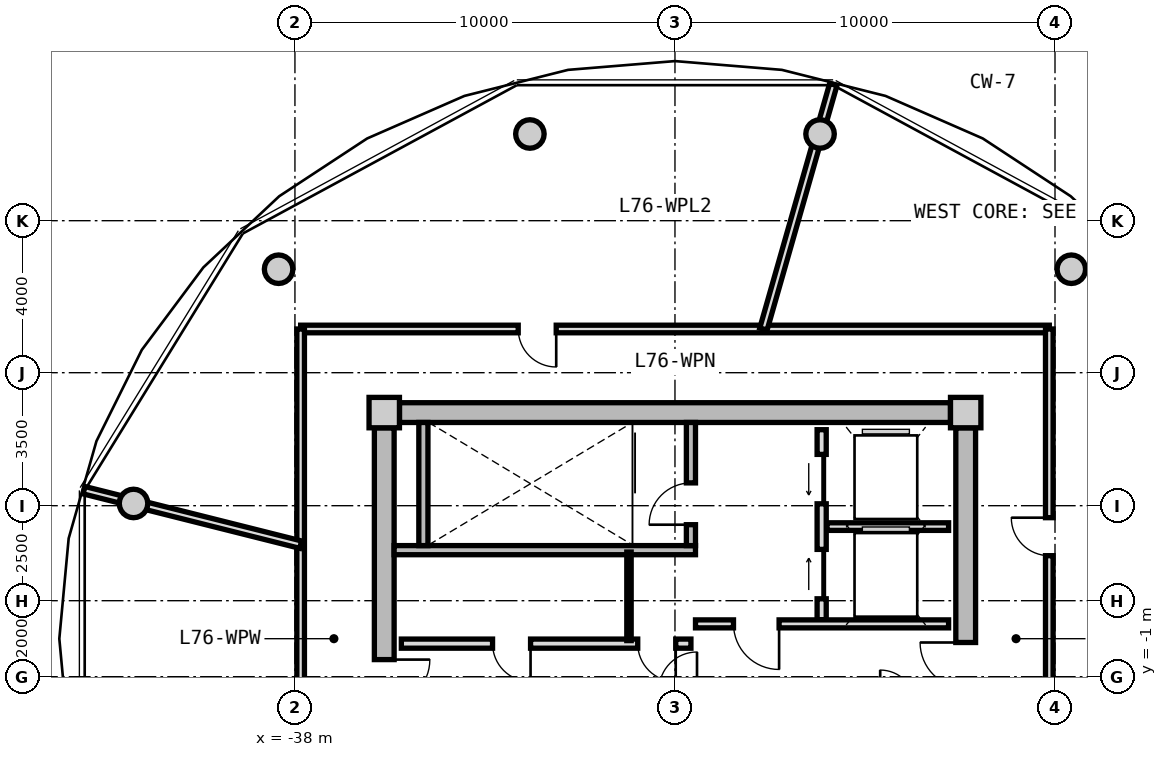
"""IFC4 building model, lengths in metres.
Left out: names, types, materials, properties, quantities, classifications, styles, units other than length and angle.
Written with IfcOpenShell. Run it as: python <this file> out.ifc"""

import sys

from ifc_helpers import new_model, si_unit, direction, frame, frame_2d, origin, origin_2d, place, context, subcontext, project, spatial, rectangle, circle, extrude, source, transform, mapped, element, fill, save


model = new_model("IFC4")
c1 = context("Model", 3, precision=1e-05, world=origin(), true_north=direction((0.0, 1.0)))
c2 = subcontext(c1, "Body", "Model", "MODEL_VIEW")
j1 = project(units=[si_unit("LENGTHUNIT", "METRE"), si_unit("PLANEANGLEUNIT", "RADIAN")], contexts=[c1])
p1 = place(None, origin())
s1 = spatial("IfcSite", under=j1, at=p1, CompositionType="ELEMENT")
p2 = place(p1, origin())
s2 = spatial("IfcBuilding", under=s1, at=p2, CompositionType="ELEMENT")
p3 = place(p2, frame((0.0, 0.0, 244.4)))
s3 = spatial("IfcBuildingStorey", under=s2, at=p3, CompositionType="ELEMENT", Elevation=244.4)
m1 = source(origin(), c2, "Body", "SweptSolid", [
    extrude(rectangle(XDim=0.8, YDim=0.8, at=origin_2d()), origin(), (0.0, 0.0, 1.0), 5.45),
])
for number, where, z_axis, x_axis in (
    (1, (-20.35, 5.95, 0.0), (0.0, 0.0, 1.0), (1.0, 0.0, 0.0)),
    (2, (-35.65, 5.95, 0.0), (0.0, 0.0, 1.0), (1.0, 0.0, 0.0)),
):
    element("IfcColumn", number, at=place(p3, frame(where, z_axis=z_axis, x_axis=x_axis)), inside=s3, PredefinedType="COLUMN", context=c2, shape_type="MappedRepresentation", body=[
        mapped(m1, transform((0.0, 0.0, 0.0), x_axis=(1.0, 0.0, 0.0), y_axis=(0.0, 1.0, 0.0), z_axis=(0.0, 0.0, 1.0), scale=1.0)),
    ])
m2 = source(origin(), c2, "Body", "SweptSolid", [
    extrude(rectangle(XDim=14.5, YDim=0.52, at=frame_2d((7.25, 0.0))), origin(), (0.0, 0.0, 1.0), 5.175),
])
p4 = place(p3, frame((-35.25, 5.95, 0.0), z_axis=(0.0, 0.0, 1.0), x_axis=(1.0, 0.0, 0.0)))
e3 = element("IfcWall", 3, at=p4, inside=s3, PredefinedType="SHEAR", context=c2, shape_type="MappedRepresentation", body=[
    mapped(m2, transform((0.0, 0.0, 0.0), x_axis=(1.0, 0.0, 0.0), y_axis=(0.0, 1.0, 0.0), z_axis=(0.0, 0.0, 1.0), scale=1.0)),
])
m3 = source(origin(), c2, "Body", "SweptSolid", [
    extrude(rectangle(XDim=11.1, YDim=0.52, at=frame_2d((5.55, 0.0))), origin(), (0.0, 0.0, 1.0), 5.175),
])
p5 = place(p3, frame((-35.65, -5.55, 0.0), z_axis=(0.0, 0.0, 1.0), x_axis=(0.0, 1.0, 0.0)))
e4 = element("IfcWall", 4, at=p5, inside=s3, PredefinedType="SHEAR", context=c2, shape_type="MappedRepresentation", body=[
    mapped(m3, transform((0.0, 0.0, 0.0), x_axis=(1.0, 0.0, 0.0), y_axis=(0.0, 1.0, 0.0), z_axis=(0.0, 0.0, 1.0), scale=1.0)),
])
p6 = place(p5, frame((3.8, 0.0, 0.0)))
e5 = element("IfcOpeningElement", 5, at=p6, cuts=e4, PredefinedType="OPENING", context=c2, shape_type="SweptSolid", body=[
    extrude(rectangle(XDim=1.2, YDim=2.15, at=frame_2d((0.6, 1.075))), frame((0.0, 0.27, 0.0), z_axis=(0.0, -1.0, 0.0), x_axis=(1.0, 0.0, 0.0)), (0.0, 0.0, 1.0), 0.54),
])
p7 = place(p3, frame((-20.35, 5.55, 0.0), z_axis=(0.0, 0.0, 1.0), x_axis=(0.0, -1.0, 0.0)))
e6 = element("IfcWall", 6, at=p7, inside=s3, PredefinedType="SHEAR", context=c2, shape_type="MappedRepresentation", body=[
    mapped(m3, transform((0.0, 0.0, 0.0), x_axis=(1.0, 0.0, 0.0), y_axis=(0.0, 1.0, 0.0), z_axis=(0.0, 0.0, 1.0), scale=1.0)),
])
p8 = place(p7, frame((5.65, 0.0, 0.0)))
e7 = element("IfcOpeningElement", 7, at=p8, cuts=e6, PredefinedType="OPENING", context=c2, shape_type="SweptSolid", body=[
    extrude(rectangle(XDim=1.2, YDim=2.15, at=frame_2d((0.6, 1.075))), frame((0.0, 0.27, 0.0), z_axis=(0.0, -1.0, 0.0), x_axis=(1.0, 0.0, 0.0)), (0.0, 0.0, 1.0), 0.54),
])
p9 = place(p7, frame((9.3, 0.0, 0.0)))
e8 = element("IfcOpeningElement", 8, at=p9, cuts=e6, PredefinedType="OPENING", context=c2, shape_type="SweptSolid", body=[
    extrude(rectangle(XDim=1.0, YDim=2.1, at=frame_2d((0.5, 1.05))), frame((0.0, 0.27, 0.0), z_axis=(0.0, -1.0, 0.0), x_axis=(1.0, 0.0, 0.0)), (0.0, 0.0, 1.0), 0.54),
])
m4 = source(origin(), c2, "Body", "SweptSolid", [
    extrude(circle(Radius=0.375, at=origin_2d()), origin(), (0.0, 0.0, 1.0), 5.45),
])
for number, where, z_axis, x_axis in (
    (9, (-17.57, 9.723, 0.0), (0.0, 0.0, 1.0), (1.0, 0.0, 0.0)),
    (10, (-24.182, 13.281, 0.0), (0.0, 0.0, 1.0), (1.0, 0.0, 0.0)),
    (11, (-31.818, 13.281, 0.0), (0.0, 0.0, 1.0), (1.0, 0.0, 0.0)),
    (12, (-38.43, 9.723, 0.0), (0.0, 0.0, 1.0), (1.0, 0.0, 0.0)),
    (13, (-42.247, 3.559, 0.0), (0.0, 0.0, 1.0), (1.0, 0.0, 0.0)),
):
    element("IfcColumn", number, at=place(p3, frame(where, z_axis=z_axis, x_axis=x_axis)), inside=s3, PredefinedType="COLUMN", context=c2, shape_type="MappedRepresentation", body=[
        mapped(m4, transform((0.0, 0.0, 0.0), x_axis=(1.0, 0.0, 0.0), y_axis=(0.0, 1.0, 0.0), z_axis=(0.0, 0.0, 1.0), scale=1.0)),
    ])
m5 = source(origin(), c2, "Body", "SweptSolid", [
    extrude(rectangle(XDim=7.93, YDim=0.24, at=frame_2d((3.965, 0.0))), origin(), (0.0, 0.0, 1.0), 5.175),
])
p10 = place(p3, frame((-35.39, 2.33, 0.0), z_axis=(0.0, 0.0, 1.0), x_axis=(1.0, 0.0, 0.0)))
e14 = element("IfcWall", 14, at=p10, inside=s3, PredefinedType="PARTITIONING", context=c2, shape_type="MappedRepresentation", body=[
    mapped(m5, transform((0.0, 0.0, 0.0), x_axis=(1.0, 0.0, 0.0), y_axis=(0.0, 1.0, 0.0), z_axis=(0.0, 0.0, 1.0), scale=1.0)),
])
m6 = source(origin(), c2, "Body", "SweptSolid", [
    extrude(rectangle(XDim=3.24, YDim=0.24, at=frame_2d((1.62, 0.0))), origin(), (0.0, 0.0, 1.0), 5.175),
])
p11 = place(p3, frame((-34.62, 2.45, 0.0), z_axis=(0.0, 0.0, 1.0), x_axis=(0.0, 1.0, 0.0)))
e15 = element("IfcWall", 15, at=p11, inside=s3, PredefinedType="PARTITIONING", context=c2, shape_type="MappedRepresentation", body=[
    mapped(m6, transform((0.0, 0.0, 0.0), x_axis=(1.0, 0.0, 0.0), y_axis=(0.0, 1.0, 0.0), z_axis=(0.0, 0.0, 1.0), scale=1.0)),
])
p12 = place(p3, frame((-27.58, 2.45, 0.0), z_axis=(0.0, 0.0, 1.0), x_axis=(0.0, 1.0, 0.0)))
e16 = element("IfcWall", 16, at=p12, inside=s3, PredefinedType="PARTITIONING", context=c2, shape_type="MappedRepresentation", body=[
    mapped(m6, transform((0.0, 0.0, 0.0), x_axis=(1.0, 0.0, 0.0), y_axis=(0.0, 1.0, 0.0), z_axis=(0.0, 0.0, 1.0), scale=1.0)),
])
p13 = place(p12, frame((0.55, 0.0, 0.0)))
e17 = element("IfcOpeningElement", 17, at=p13, cuts=e16, PredefinedType="OPENING", context=c2, shape_type="SweptSolid", body=[
    extrude(rectangle(XDim=1.1, YDim=2.15, at=frame_2d((0.55, 1.075))), frame((0.0, 0.13, 0.0), z_axis=(0.0, -1.0, 0.0), x_axis=(1.0, 0.0, 0.0)), (0.0, 0.0, 1.0), 0.26),
])
m7 = source(origin(), c2, "Body", "SweptSolid", [
    extrude(rectangle(XDim=5.0, YDim=0.24, at=frame_2d((2.5, 0.0))), origin(), (0.0, 0.0, 1.0), 5.16),
])
p14 = place(p3, frame((-24.14, 0.5, 0.0), z_axis=(0.0, 0.0, 1.0), x_axis=(0.0, 1.0, 0.0)))
e18 = element("IfcWall", 18, at=p14, inside=s3, PredefinedType="PARTITIONING", context=c2, shape_type="MappedRepresentation", body=[
    mapped(m7, transform((0.0, 0.0, 0.0), x_axis=(1.0, 0.0, 0.0), y_axis=(0.0, 1.0, 0.0), z_axis=(0.0, 0.0, 1.0), scale=1.0)),
])
p15 = place(p14, frame((3.05, 0.0, 0.0)))
e19 = element("IfcOpeningElement", 19, at=p15, cuts=e18, PredefinedType="OPENING", context=c2, shape_type="SweptSolid", body=[
    extrude(rectangle(XDim=1.3, YDim=2.2, at=frame_2d((0.65, 1.1))), frame((0.0, 0.13, 0.0), z_axis=(0.0, -1.0, 0.0), x_axis=(1.0, 0.0, 0.0)), (0.0, 0.0, 1.0), 0.26),
])
p16 = place(p14, frame((0.55, 0.0, 0.0)))
e20 = element("IfcOpeningElement", 20, at=p16, cuts=e18, PredefinedType="OPENING", context=c2, shape_type="SweptSolid", body=[
    extrude(rectangle(XDim=1.3, YDim=2.2, at=frame_2d((0.65, 1.1))), frame((0.0, 0.13, 0.0), z_axis=(0.0, -1.0, 0.0), x_axis=(1.0, 0.0, 0.0)), (0.0, 0.0, 1.0), 0.26),
])
m8 = source(origin(), c2, "Body", "SweptSolid", [
    extrude(rectangle(XDim=3.2, YDim=0.2, at=frame_2d((1.6, 0.0))), origin(), (0.0, 0.0, 1.0), 5.16),
])
p17 = place(p3, frame((-24.0, 2.95, 0.0), z_axis=(0.0, 0.0, 1.0), x_axis=(1.0, 0.0, 0.0)))
e21 = element("IfcWall", 21, at=p17, inside=s3, PredefinedType="PARTITIONING", context=c2, shape_type="MappedRepresentation", body=[
    mapped(m8, transform((0.0, 0.0, 0.0), x_axis=(1.0, 0.0, 0.0), y_axis=(0.0, 1.0, 0.0), z_axis=(0.0, 0.0, 1.0), scale=1.0)),
])
m9 = source(origin(), c2, "Body", "SweptSolid", [
    extrude(rectangle(XDim=6.66, YDim=0.21, at=frame_2d((3.33, 0.0))), origin(), (0.0, 0.0, 1.0), 5.16),
])
p18 = place(p3, frame((-27.46, 0.39, 0.0), z_axis=(0.0, 0.0, 1.0), x_axis=(1.0, 0.0, 0.0)))
e22 = element("IfcWall", 22, at=p18, inside=s3, PredefinedType="PARTITIONING", context=c2, shape_type="MappedRepresentation", body=[
    mapped(m9, transform((0.0, 0.0, 0.0), x_axis=(1.0, 0.0, 0.0), y_axis=(0.0, 1.0, 0.0), z_axis=(0.0, 0.0, 1.0), scale=1.0)),
])
p19 = place(p18, frame((1.0, 0.0, 0.0)))
e23 = element("IfcOpeningElement", 23, at=p19, cuts=e22, PredefinedType="OPENING", context=c2, shape_type="SweptSolid", body=[
    extrude(rectangle(XDim=1.2, YDim=2.15, at=frame_2d((0.6, 1.075))), frame((0.0, 0.115, 0.0), z_axis=(0.0, -1.0, 0.0), x_axis=(1.0, 0.0, 0.0)), (0.0, 0.0, 1.0), 0.23),
])
m10 = source(origin(), c2, "Body", "SweptSolid", [
    extrude(rectangle(XDim=7.62, YDim=0.24, at=frame_2d((3.81, 0.0))), origin(), (0.0, 0.0, 1.0), 5.16),
])
p20 = place(p3, frame((-35.2, -0.13, 0.0), z_axis=(0.0, 0.0, 1.0), x_axis=(1.0, 0.0, 0.0)))
e24 = element("IfcWall", 24, at=p20, inside=s3, PredefinedType="PARTITIONING", context=c2, shape_type="MappedRepresentation", body=[
    mapped(m10, transform((0.0, 0.0, 0.0), x_axis=(1.0, 0.0, 0.0), y_axis=(0.0, 1.0, 0.0), z_axis=(0.0, 0.0, 1.0), scale=1.0)),
])
p21 = place(p20, frame((6.22, 0.0, 0.0)))
e25 = element("IfcOpeningElement", 25, at=p21, cuts=e24, PredefinedType="OPENING", context=c2, shape_type="SweptSolid", body=[
    extrude(rectangle(XDim=1.0, YDim=2.1, at=frame_2d((0.5, 1.05))), frame((0.0, 0.13, 0.0), z_axis=(0.0, -1.0, 0.0), x_axis=(1.0, 0.0, 0.0)), (0.0, 0.0, 1.0), 0.26),
])
p22 = place(p20, frame((2.4, 0.0, 0.0)))
e26 = element("IfcOpeningElement", 26, at=p22, cuts=e24, PredefinedType="OPENING", context=c2, shape_type="SweptSolid", body=[
    extrude(rectangle(XDim=1.0, YDim=2.1, at=frame_2d((0.5, 1.05))), frame((0.0, 0.13, 0.0), z_axis=(0.0, -1.0, 0.0), x_axis=(1.0, 0.0, 0.0)), (0.0, 0.0, 1.0), 0.26),
])
m11 = source(origin(), c2, "Body", "SweptSolid", [
    extrude(rectangle(XDim=2.33, YDim=0.115, at=frame_2d((1.165, 0.0))), origin(), (0.0, 0.0, 1.0), 5.16),
])
p23 = place(p3, frame((-29.21, -0.05, 0.0), z_axis=(0.0, 0.0, 1.0), x_axis=(0.0, 1.0, 0.0)))
e27 = element("IfcWall", 27, at=p23, inside=s3, PredefinedType="PARTITIONING", context=c2, shape_type="MappedRepresentation", body=[
    mapped(m11, transform((0.0, 0.0, 0.0), x_axis=(1.0, 0.0, 0.0), y_axis=(0.0, 1.0, 0.0), z_axis=(0.0, 0.0, 1.0), scale=1.0)),
])
m12 = source(origin(), c2, "Body", "SweptSolid", [
    extrude(rectangle(XDim=19.7, YDim=0.2, at=frame_2d((9.85, 0.0))), origin(), (0.0, 0.0, 1.0), 5.16),
])
p24 = place(p3, frame((-37.85, 8.15, 0.0), z_axis=(0.0, 0.0, 1.0), x_axis=(1.0, 0.0, 0.0)))
e28 = element("IfcWall", 28, at=p24, inside=s3, PredefinedType="PARTITIONING", context=c2, shape_type="MappedRepresentation", body=[
    mapped(m12, transform((0.0, 0.0, 0.0), x_axis=(1.0, 0.0, 0.0), y_axis=(0.0, 1.0, 0.0), z_axis=(0.0, 0.0, 1.0), scale=1.0)),
])
p25 = place(p24, frame((5.725, 0.0, 0.0)))
e29 = element("IfcOpeningElement", 29, at=p25, cuts=e28, PredefinedType="OPENING", context=c2, shape_type="SweptSolid", body=[
    extrude(rectangle(XDim=1.0, YDim=2.1, at=frame_2d((0.5, 1.05))), frame((0.0, 0.11, 0.0), z_axis=(0.0, -1.0, 0.0), x_axis=(1.0, 0.0, 0.0)), (0.0, 0.0, 1.0), 0.22),
])
m13 = source(origin(), c2, "Body", "SweptSolid", [
    extrude(rectangle(XDim=16.3, YDim=0.2, at=frame_2d((8.15, 0.0))), origin(), (0.0, 0.0, 1.0), 5.16),
])
p26 = place(p3, frame((-37.85, -8.15, 0.0), z_axis=(0.0, 0.0, 1.0), x_axis=(0.0, 1.0, 0.0)))
e30 = element("IfcWall", 30, at=p26, inside=s3, PredefinedType="PARTITIONING", context=c2, shape_type="MappedRepresentation", body=[
    mapped(m13, transform((0.0, 0.0, 0.0), x_axis=(1.0, 0.0, 0.0), y_axis=(0.0, 1.0, 0.0), z_axis=(0.0, 0.0, 1.0), scale=1.0)),
])
p27 = place(p26, frame((4.966, 0.0, 0.0)))
e31 = element("IfcOpeningElement", 31, at=p27, cuts=e30, PredefinedType="OPENING", context=c2, shape_type="SweptSolid", body=[
    extrude(rectangle(XDim=1.0, YDim=2.1, at=frame_2d((0.5, 1.05))), frame((0.0, 0.11, 0.0), z_axis=(0.0, -1.0, 0.0), x_axis=(1.0, 0.0, 0.0)), (0.0, 0.0, 1.0), 0.22),
])
p28 = place(p3, frame((-18.15, 8.15, 0.0), z_axis=(0.0, 0.0, 1.0), x_axis=(0.0, -1.0, 0.0)))
e32 = element("IfcWall", 32, at=p28, inside=s3, PredefinedType="PARTITIONING", context=c2, shape_type="MappedRepresentation", body=[
    mapped(m13, transform((0.0, 0.0, 0.0), x_axis=(1.0, 0.0, 0.0), y_axis=(0.0, 1.0, 0.0), z_axis=(0.0, 0.0, 1.0), scale=1.0)),
])
p29 = place(p28, frame((4.966, 0.0, 0.0)))
e33 = element("IfcOpeningElement", 33, at=p29, cuts=e32, PredefinedType="OPENING", context=c2, shape_type="SweptSolid", body=[
    extrude(rectangle(XDim=1.0, YDim=2.1, at=frame_2d((0.5, 1.05))), frame((0.0, 0.11, 0.0), z_axis=(0.0, -1.0, 0.0), x_axis=(1.0, 0.0, 0.0)), (0.0, 0.0, 1.0), 0.22),
])
m14 = source(origin(), c2, "Body", "SweptSolid", [
    extrude(rectangle(XDim=6.693, YDim=0.2, at=frame_2d((3.347, 0.0))), origin(), (0.0, 0.0, 1.0), 4.76),
])
p30 = place(p3, frame((-25.672, 8.15, 0.0), z_axis=(0.0, 0.0, 1.0), x_axis=(0.2747066748, 0.96152807698, 0.0)))
e34 = element("IfcWall", 34, at=p30, inside=s3, PredefinedType="PARTITIONING", context=c2, shape_type="MappedRepresentation", body=[
    mapped(m14, transform((0.0, 0.0, 0.0), x_axis=(1.0, 0.0, 0.0), y_axis=(0.0, 1.0, 0.0), z_axis=(0.0, 0.0, 1.0), scale=1.0)),
])
m15 = source(origin(), c2, "Body", "SweptSolid", [
    extrude(rectangle(XDim=5.879, YDim=0.2, at=frame_2d((2.939, 0.0))), origin(), (0.0, 0.0, 1.0), 4.76),
])
p31 = place(p3, frame((-37.85, 2.475, 0.0), z_axis=(0.0, 0.0, 1.0), x_axis=(-0.96984127658, 0.24373735504, 0.0)))
e35 = element("IfcWall", 35, at=p31, inside=s3, PredefinedType="PARTITIONING", context=c2, shape_type="MappedRepresentation", body=[
    mapped(m15, transform((0.0, 0.0, 0.0), x_axis=(1.0, 0.0, 0.0), y_axis=(0.0, 1.0, 0.0), z_axis=(0.0, 0.0, 1.0), scale=1.0)),
])
m16 = source(origin(), c2, "Body", "SweptSolid", [
    extrude(rectangle(XDim=1.1, YDim=2.15, at=frame_2d((0.55, 1.075))), frame((0.0, 0.025, 0.0), z_axis=(0.0, -1.0, 0.0), x_axis=(1.0, 0.0, 0.0)), (0.0, 0.0, 1.0), 0.05),
])
p32 = place(p13, origin())
e36 = element("IfcDoor", 36, at=p32, inside=s3, OperationType="SINGLE_SWING_LEFT", PredefinedType="DOOR", context=c2, shape_type="MappedRepresentation", body=[
    mapped(m16, transform((0.0, 0.0, 0.0), x_axis=(1.0, 0.0, 0.0), y_axis=(0.0, 1.0, 0.0), z_axis=(0.0, 0.0, 1.0), scale=1.0)),
])
fill(e17, e36)
m17 = source(origin(), c2, "Body", "SweptSolid", [
    extrude(rectangle(XDim=1.3, YDim=2.2, at=frame_2d((0.65, 1.1))), frame((0.0, 0.025, 0.0), z_axis=(0.0, -1.0, 0.0), x_axis=(1.0, 0.0, 0.0)), (0.0, 0.0, 1.0), 0.05),
])
p33 = place(p15, origin())
e37 = element("IfcDoor", 37, at=p33, inside=s3, OperationType="SLIDING_TO_LEFT", PredefinedType="DOOR", context=c2, shape_type="MappedRepresentation", body=[
    mapped(m17, transform((0.0, 0.0, 0.0), x_axis=(1.0, 0.0, 0.0), y_axis=(0.0, 1.0, 0.0), z_axis=(0.0, 0.0, 1.0), scale=1.0)),
])
fill(e19, e37)
p34 = place(p16, origin())
e38 = element("IfcDoor", 38, at=p34, inside=s3, OperationType="SLIDING_TO_RIGHT", PredefinedType="DOOR", context=c2, shape_type="MappedRepresentation", body=[
    mapped(m17, transform((0.0, 0.0, 0.0), x_axis=(1.0, 0.0, 0.0), y_axis=(0.0, 1.0, 0.0), z_axis=(0.0, 0.0, 1.0), scale=1.0)),
])
fill(e20, e38)
m18 = source(origin(), c2, "Body", "SweptSolid", [
    extrude(rectangle(XDim=1.2, YDim=2.15, at=frame_2d((0.6, 1.075))), frame((0.0, 0.025, 0.0), z_axis=(0.0, -1.0, 0.0), x_axis=(1.0, 0.0, 0.0)), (0.0, 0.0, 1.0), 0.05),
])
p35 = place(p19, frame((1.2, 0.0, 0.0), z_axis=(0.0, 0.0, 1.0), x_axis=(-1.0, 0.0, 0.0)))
e39 = element("IfcDoor", 39, at=p35, inside=s3, OperationType="SINGLE_SWING_LEFT", PredefinedType="DOOR", context=c2, shape_type="MappedRepresentation", body=[
    mapped(m18, transform((0.0, 0.0, 0.0), x_axis=(1.0, 0.0, 0.0), y_axis=(0.0, 1.0, 0.0), z_axis=(0.0, 0.0, 1.0), scale=1.0)),
])
fill(e23, e39)
p36 = place(p6, frame((1.2, 0.0, 0.0), z_axis=(0.0, 0.0, 1.0), x_axis=(-1.0, 0.0, 0.0)))
e40 = element("IfcDoor", 40, at=p36, inside=s3, OperationType="SINGLE_SWING_LEFT", PredefinedType="DOOR", context=c2, shape_type="MappedRepresentation", body=[
    mapped(m18, transform((0.0, 0.0, 0.0), x_axis=(1.0, 0.0, 0.0), y_axis=(0.0, 1.0, 0.0), z_axis=(0.0, 0.0, 1.0), scale=1.0)),
])
fill(e5, e40)
p37 = place(p8, frame((1.2, 0.0, 0.0), z_axis=(0.0, 0.0, 1.0), x_axis=(-1.0, 0.0, 0.0)))
e41 = element("IfcDoor", 41, at=p37, inside=s3, OperationType="SINGLE_SWING_RIGHT", PredefinedType="DOOR", context=c2, shape_type="MappedRepresentation", body=[
    mapped(m18, transform((0.0, 0.0, 0.0), x_axis=(1.0, 0.0, 0.0), y_axis=(0.0, 1.0, 0.0), z_axis=(0.0, 0.0, 1.0), scale=1.0)),
])
fill(e7, e41)
m19 = source(origin(), c2, "Body", "SweptSolid", [
    extrude(rectangle(XDim=1.0, YDim=2.1, at=frame_2d((0.5, 1.05))), frame((0.0, 0.025, 0.0), z_axis=(0.0, -1.0, 0.0), x_axis=(1.0, 0.0, 0.0)), (0.0, 0.0, 1.0), 0.05),
])
p38 = place(p21, frame((1.0, 0.0, 0.0), z_axis=(0.0, 0.0, 1.0), x_axis=(-1.0, 0.0, 0.0)))
e42 = element("IfcDoor", 42, at=p38, inside=s3, OperationType="SINGLE_SWING_LEFT", PredefinedType="DOOR", context=c2, shape_type="MappedRepresentation", body=[
    mapped(m19, transform((0.0, 0.0, 0.0), x_axis=(1.0, 0.0, 0.0), y_axis=(0.0, 1.0, 0.0), z_axis=(0.0, 0.0, 1.0), scale=1.0)),
])
fill(e25, e42)
p39 = place(p22, frame((1.0, 0.0, 0.0), z_axis=(0.0, 0.0, 1.0), x_axis=(-1.0, 0.0, 0.0)))
e43 = element("IfcDoor", 43, at=p39, inside=s3, OperationType="SINGLE_SWING_LEFT", PredefinedType="DOOR", context=c2, shape_type="MappedRepresentation", body=[
    mapped(m19, transform((0.0, 0.0, 0.0), x_axis=(1.0, 0.0, 0.0), y_axis=(0.0, 1.0, 0.0), z_axis=(0.0, 0.0, 1.0), scale=1.0)),
])
fill(e26, e43)
p40 = place(p29, frame((1.0, 0.0, 0.0), z_axis=(0.0, 0.0, 1.0), x_axis=(-1.0, 0.0, 0.0)))
e44 = element("IfcDoor", 44, at=p40, inside=s3, OperationType="SINGLE_SWING_RIGHT", PredefinedType="DOOR", context=c2, shape_type="MappedRepresentation", body=[
    mapped(m19, transform((0.0, 0.0, 0.0), x_axis=(1.0, 0.0, 0.0), y_axis=(0.0, 1.0, 0.0), z_axis=(0.0, 0.0, 1.0), scale=1.0)),
])
fill(e33, e44)
p41 = place(p25, frame((1.0, 0.0, 0.0), z_axis=(0.0, 0.0, 1.0), x_axis=(-1.0, 0.0, 0.0)))
e45 = element("IfcDoor", 45, at=p41, inside=s3, OperationType="SINGLE_SWING_LEFT", PredefinedType="DOOR", context=c2, shape_type="MappedRepresentation", body=[
    mapped(m19, transform((0.0, 0.0, 0.0), x_axis=(1.0, 0.0, 0.0), y_axis=(0.0, 1.0, 0.0), z_axis=(0.0, 0.0, 1.0), scale=1.0)),
])
fill(e29, e45)
save(model, sys.argv[1])
